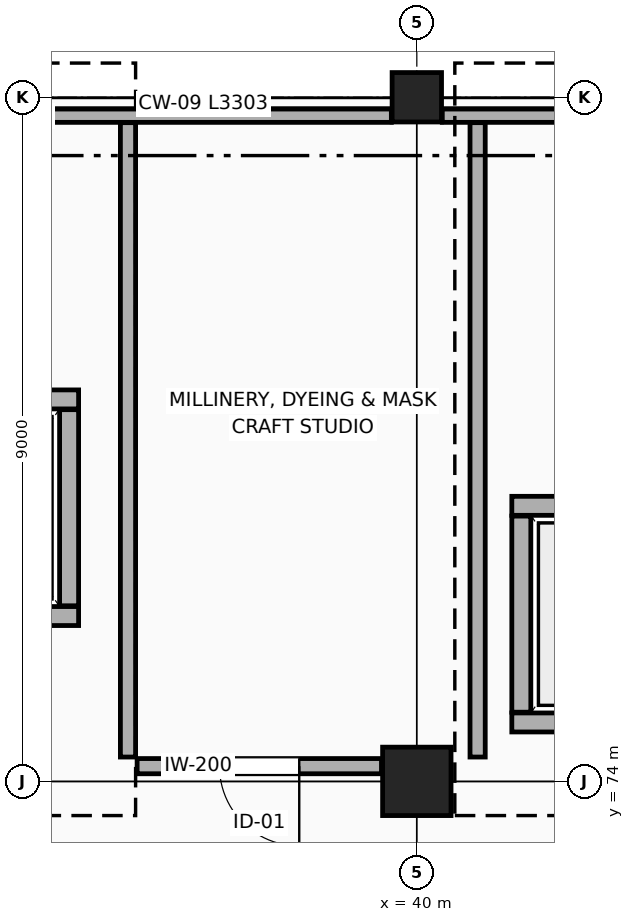
"""IFC4 building model, lengths in metres.
Left out: names, types, materials, properties, quantities, classifications, styles, units other than length and angle.
Written with IfcOpenShell. Run it as: python <this file> out.ifc"""

import sys

from ifc_helpers import new_model, si_unit, direction, frame, frame_2d, origin, origin_2d, place, context, subcontext, project, spatial, rectangle, extrude, element, fill, save


model = new_model("IFC4")
c1 = context("Model", 3, precision=1e-05, world=origin(), true_north=direction((0.0, 1.0)))
c2 = subcontext(c1, "Body", "Model", "MODEL_VIEW")
j1 = project(units=[si_unit("LENGTHUNIT", "METRE"), si_unit("PLANEANGLEUNIT", "RADIAN")], contexts=[c1])
p1 = place(None, origin())
s1 = spatial("IfcSite", under=j1, at=p1, CompositionType="ELEMENT")
p2 = place(p1, origin())
s2 = spatial("IfcBuilding", under=s1, at=p2, CompositionType="ELEMENT")
p3 = place(p2, frame((0.0, 0.0, 10.2)))
s3 = spatial("IfcBuildingStorey", under=s2, at=p3, CompositionType="ELEMENT", Elevation=10.2)
p4 = place(p3, frame((40.0, 74.0, 0.0), z_axis=(0.0, 0.0, 1.0), x_axis=(1.0, 0.0, 0.0)))
e1 = element("IfcColumn", 1, at=p4, inside=s3, PredefinedType="COLUMN", context=c2, shape_type="SweptSolid", body=[
    extrude(rectangle(XDim=0.9, YDim=0.9, at=origin_2d()), origin(), (0.0, 0.0, 1.0), 4.8),
])
p5 = place(p3, frame((40.0, 83.0, 0.0), z_axis=(0.0, 0.0, 1.0), x_axis=(1.0, 0.0, 0.0)))
e2 = element("IfcColumn", 2, at=p5, inside=s3, PredefinedType="COLUMN", context=c2, shape_type="SweptSolid", body=[
    extrude(rectangle(XDim=0.65, YDim=0.65, at=origin_2d()), origin(), (0.0, 0.0, 1.0), 4.8),
])
p6 = place(p3, frame((33.17, 82.76, 0.0), z_axis=(0.0, 0.0, 1.0), x_axis=(1.0, 0.0, 0.0)))
e3 = element("IfcWall", 3, at=p6, inside=s3, PredefinedType="PARAPET", context=c2, shape_type="SweptSolid", body=[
    extrude(rectangle(XDim=6.495, YDim=0.18, at=frame_2d((3.248, 0.0))), origin(), (0.0, 0.0, 1.0), 0.88),
])
p7 = place(p3, frame((40.335, 82.76, 0.0), z_axis=(0.0, 0.0, 1.0), x_axis=(1.0, 0.0, 0.0)))
e4 = element("IfcWall", 4, at=p7, inside=s3, PredefinedType="PARAPET", context=c2, shape_type="SweptSolid", body=[
    extrude(rectangle(XDim=7.33, YDim=0.18, at=frame_2d((3.665, 0.0))), origin(), (0.0, 0.0, 1.0), 0.88),
])
p8 = place(p3, frame((41.25, 74.775, 0.0), z_axis=(0.0, 0.0, 1.0), x_axis=(1.0, 0.0, 0.0)))
e5 = element("IfcWall", 5, at=p8, inside=s3, PredefinedType="STANDARD", context=c2, shape_type="SweptSolid", body=[
    extrude(rectangle(XDim=2.3, YDim=0.25, at=frame_2d((1.15, 0.0))), origin(), (0.0, 0.0, 1.0), 4.53),
])
p9 = place(p8, frame((0.6, 0.0, 0.0)))
e6 = element("IfcOpeningElement", 6, at=p9, cuts=e5, PredefinedType="OPENING", context=c2, shape_type="SweptSolid", body=[
    extrude(rectangle(XDim=1.1, YDim=2.15, at=frame_2d((0.55, 1.075))), frame((0.0, 0.135, 0.0), z_axis=(0.0, -1.0, 0.0), x_axis=(1.0, 0.0, 0.0)), (0.0, 0.0, 1.0), 0.27),
])
p10 = place(p3, frame((43.55, 77.625, 0.0), z_axis=(0.0, 0.0, 1.0), x_axis=(-1.0, 0.0, 0.0)))
e7 = element("IfcWall", 7, at=p10, inside=s3, PredefinedType="STANDARD", context=c2, shape_type="SweptSolid", body=[
    extrude(rectangle(XDim=2.3, YDim=0.25, at=frame_2d((1.15, 0.0))), origin(), (0.0, 0.0, 1.0), 4.53),
])
p11 = place(p3, frame((41.375, 77.49, 0.0), z_axis=(0.0, 0.0, 1.0), x_axis=(0.0, -1.0, 0.0)))
e8 = element("IfcWall", 8, at=p11, inside=s3, PredefinedType="STANDARD", context=c2, shape_type="SweptSolid", body=[
    extrude(rectangle(XDim=2.58, YDim=0.25, at=frame_2d((1.29, 0.0))), origin(), (0.0, 0.0, 1.0), 4.53),
])
p12 = place(p3, frame((33.25, 76.175, 0.0), z_axis=(0.0, 0.0, 1.0), x_axis=(1.0, 0.0, 0.0)))
e9 = element("IfcWall", 9, at=p12, inside=s3, PredefinedType="STANDARD", context=c2, shape_type="SweptSolid", body=[
    extrude(rectangle(XDim=2.3, YDim=0.25, at=frame_2d((1.15, 0.0))), origin(), (0.0, 0.0, 1.0), 4.53),
])
p13 = place(p12, frame((0.6, 0.0, 0.0)))
e10 = element("IfcOpeningElement", 10, at=p13, cuts=e9, PredefinedType="OPENING", context=c2, shape_type="SweptSolid", body=[
    extrude(rectangle(XDim=1.1, YDim=2.15, at=frame_2d((0.55, 1.075))), frame((0.0, 0.135, 0.0), z_axis=(0.0, -1.0, 0.0), x_axis=(1.0, 0.0, 0.0)), (0.0, 0.0, 1.0), 0.27),
])
p14 = place(p3, frame((35.55, 79.025, 0.0), z_axis=(0.0, 0.0, 1.0), x_axis=(-1.0, 0.0, 0.0)))
e11 = element("IfcWall", 11, at=p14, inside=s3, PredefinedType="STANDARD", context=c2, shape_type="SweptSolid", body=[
    extrude(rectangle(XDim=2.3, YDim=0.25, at=frame_2d((1.15, 0.0))), origin(), (0.0, 0.0, 1.0), 4.53),
])
p15 = place(p3, frame((35.425, 76.31, 0.0), z_axis=(0.0, 0.0, 1.0), x_axis=(0.0, 1.0, 0.0)))
e12 = element("IfcWall", 12, at=p15, inside=s3, PredefinedType="STANDARD", context=c2, shape_type="SweptSolid", body=[
    extrude(rectangle(XDim=2.58, YDim=0.25, at=frame_2d((1.29, 0.0))), origin(), (0.0, 0.0, 1.0), 4.53),
])
p16 = place(p3, frame((40.8, 82.666, 0.0), z_axis=(0.0, 0.0, 1.0), x_axis=(0.0, -1.0, 0.0)))
e13 = element("IfcWall", 13, at=p16, inside=s3, PredefinedType="PARTITIONING", context=c2, shape_type="SweptSolid", body=[
    extrude(rectangle(XDim=8.346, YDim=0.2, at=frame_2d((4.173, 0.0))), origin(), (0.0, 0.0, 1.0), 4.53),
])
p17 = place(p3, frame((39.535, 74.2, 0.0), z_axis=(0.0, 0.0, 1.0), x_axis=(-1.0, 0.0, 0.0)))
e14 = element("IfcWall", 14, at=p17, inside=s3, PredefinedType="PARTITIONING", context=c2, shape_type="SweptSolid", body=[
    extrude(rectangle(XDim=3.215, YDim=0.2, at=frame_2d((1.607, 0.0))), origin(), (0.0, 0.0, 1.0), 4.53),
])
p18 = place(p17, frame((1.082, 0.0, 0.0)))
e15 = element("IfcOpeningElement", 15, at=p18, cuts=e14, PredefinedType="OPENING", context=c2, shape_type="SweptSolid", body=[
    extrude(rectangle(XDim=1.05, YDim=2.15, at=frame_2d((0.525, 1.075))), frame((0.0, 0.11, 0.0), z_axis=(0.0, -1.0, 0.0), x_axis=(1.0, 0.0, 0.0)), (0.0, 0.0, 1.0), 0.22),
])
p19 = place(p3, frame((36.2, 74.32, 0.0), z_axis=(0.0, 0.0, 1.0), x_axis=(0.0, 1.0, 0.0)))
e16 = element("IfcWall", 16, at=p19, inside=s3, PredefinedType="PARTITIONING", context=c2, shape_type="SweptSolid", body=[
    extrude(rectangle(XDim=8.346, YDim=0.2, at=frame_2d((4.173, 0.0))), origin(), (0.0, 0.0, 1.0), 4.53),
])
p20 = place(p18, origin())
e17 = element("IfcDoor", 17, at=p20, inside=s3, OperationType="SINGLE_SWING_LEFT", PredefinedType="DOOR", context=c2, shape_type="SweptSolid", body=[
    extrude(rectangle(XDim=1.05, YDim=2.15, at=frame_2d((0.525, 1.075))), frame((0.0, 0.025, 0.0), z_axis=(0.0, -1.0, 0.0), x_axis=(1.0, 0.0, 0.0)), (0.0, 0.0, 1.0), 0.05),
])
fill(e15, e17)
save(model, sys.argv[1])
